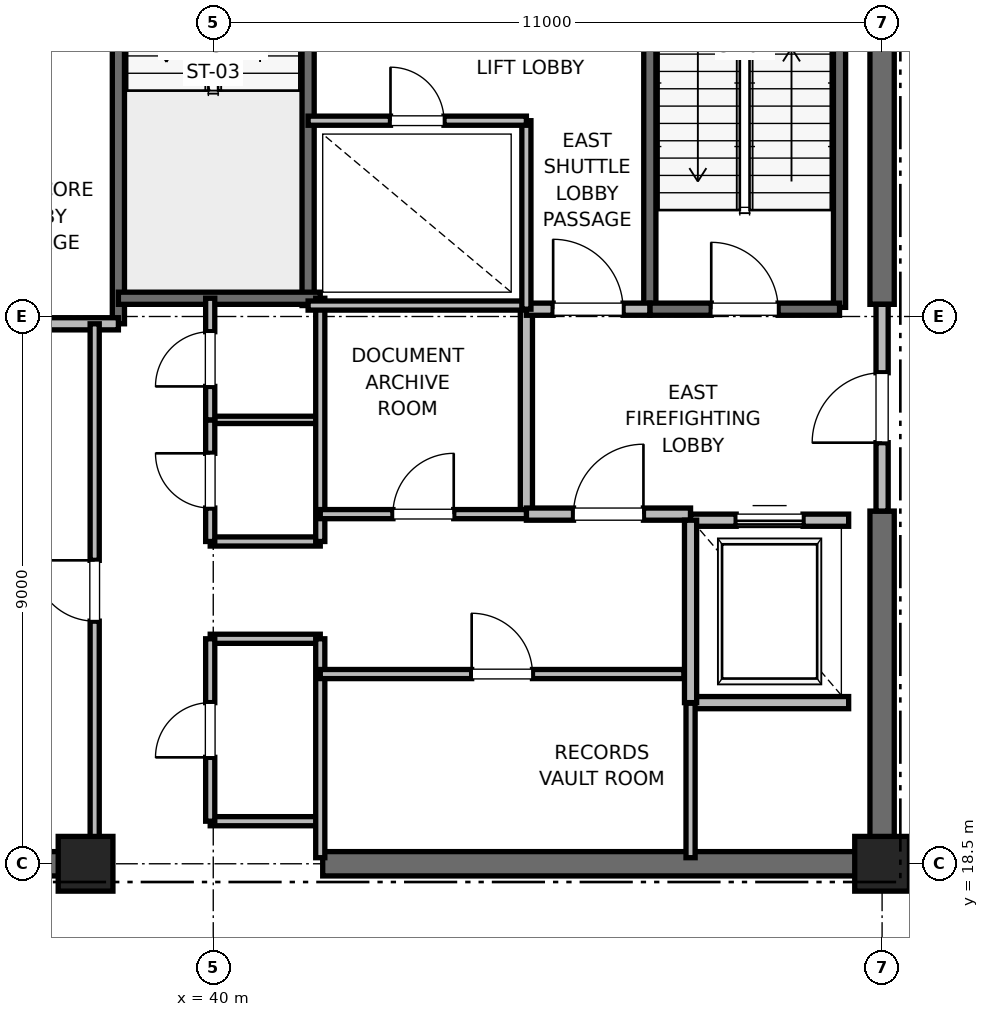
"""IFC4 building model, lengths in metres.
Left out: names, types, materials, properties, quantities, classifications, styles, units other than length and angle.
Written with IfcOpenShell. Run it as: python <this file> out.ifc"""

import sys

from ifc_helpers import new_model, si_unit, direction, frame, frame_2d, origin, origin_2d, place, context, subcontext, project, spatial, rectangle, extrude, element, fill, save


model = new_model("IFC4")
c1 = context("Model", 3, precision=1e-05, world=origin(), true_north=direction((0.0, 1.0)))
c2 = subcontext(c1, "Body", "Model", "MODEL_VIEW")
j1 = project(units=[si_unit("LENGTHUNIT", "METRE"), si_unit("PLANEANGLEUNIT", "RADIAN")], contexts=[c1])
p1 = place(None, origin())
s1 = spatial("IfcSite", under=j1, at=p1, CompositionType="ELEMENT")
p2 = place(p1, origin())
s2 = spatial("IfcBuilding", under=s1, at=p2, CompositionType="ELEMENT")
p3 = place(p2, frame((0.0, 0.0, 322.8)))
s3 = spatial("IfcBuildingStorey", under=s2, at=p3, CompositionType="ELEMENT", Elevation=322.8)
for number, where, z_axis, x_axis in (
    (1, (51.0, 18.5, 0.0), (0.0, 0.0, 1.0), (1.0, 0.0, 0.0)),
    (2, (37.9, 18.5, 0.0), (0.0, 0.0, 1.0), (1.0, 0.0, 0.0)),
):
    element("IfcColumn", number, at=place(p3, frame(where, z_axis=z_axis, x_axis=x_axis)), inside=s3, PredefinedType="PILASTER", context=c2, shape_type="SweptSolid", body=[
        extrude(rectangle(XDim=0.9, YDim=0.9, at=origin_2d()), origin(), (0.0, 0.0, 1.0), 4.0),
    ])
for number, where, z_axis, x_axis in (
    (3, (29.0, 18.5, 0.0), (0.0, 0.0, 1.0), (1.0, 0.0, 0.0)),
    (4, (41.8, 18.5, 0.0), (0.0, 0.0, 1.0), (1.0, 0.0, 0.0)),
):
    element("IfcWall", number, at=place(p3, frame(where, z_axis=z_axis, x_axis=x_axis)), inside=s3, PredefinedType="SHEAR", context=c2, shape_type="SweptSolid", body=[
        extrude(rectangle(XDim=9.2, YDim=0.4, at=frame_2d((4.6, 0.0))), origin(), (0.0, 0.0, 1.0), 3.785),
    ])
p4 = place(p3, frame((51.0, 18.5, 0.0), z_axis=(0.0, 0.0, 1.0), x_axis=(0.0, 1.0, 0.0)))
e5 = element("IfcWall", 5, at=p4, inside=s3, PredefinedType="SHEAR", context=c2, shape_type="SweptSolid", body=[
    extrude(rectangle(XDim=5.8, YDim=0.4, at=frame_2d((2.9, 0.0))), origin(), (0.0, 0.0, 1.0), 3.785),
])
p5 = place(p3, frame((51.0, 27.7, 0.0), z_axis=(0.0, 0.0, 1.0), x_axis=(0.0, 1.0, 0.0)))
e6 = element("IfcWall", 6, at=p5, inside=s3, PredefinedType="SHEAR", context=c2, shape_type="SweptSolid", body=[
    extrude(rectangle(XDim=8.8, YDim=0.4, at=frame_2d((4.4, 0.0))), origin(), (0.0, 0.0, 1.0), 3.785),
])
p6 = place(p3, frame((50.3, 27.65, 0.0), z_axis=(0.0, 0.0, 1.0), x_axis=(0.0, 1.0, 0.0)))
e7 = element("IfcWall", 7, at=p6, inside=s3, PredefinedType="SOLIDWALL", context=c2, shape_type="SweptSolid", body=[
    extrude(rectangle(XDim=8.15, YDim=0.2, at=frame_2d((4.075, 0.0))), origin(), (0.0, 0.0, 1.0), 3.785),
])
p7 = place(p3, frame((47.18, 27.62, 0.0), z_axis=(0.0, 0.0, 1.0), x_axis=(0.0, 1.0, 0.0)))
e8 = element("IfcWall", 8, at=p7, inside=s3, PredefinedType="SOLIDWALL", context=c2, shape_type="SweptSolid", body=[
    extrude(rectangle(XDim=8.18, YDim=0.2, at=frame_2d((4.09, 0.0))), origin(), (0.0, 0.0, 1.0), 3.785),
])
p8 = place(p3, frame((47.18, 27.62, 0.0), z_axis=(0.0, 0.0, 1.0), x_axis=(1.0, 0.0, 0.0)))
e9 = element("IfcWall", 9, at=p8, inside=s3, PredefinedType="SOLIDWALL", context=c2, shape_type="SweptSolid", body=[
    extrude(rectangle(XDim=3.12, YDim=0.2, at=frame_2d((1.56, 0.0))), origin(), (0.0, 0.0, 1.0), 3.785),
])
p9 = place(p8, frame((1.01, 0.0, 0.0)))
e10 = element("IfcOpeningElement", 10, at=p9, cuts=e9, PredefinedType="OPENING", context=c2, shape_type="SweptSolid", body=[
    extrude(rectangle(XDim=1.1, YDim=2.15, at=frame_2d((0.55, 1.075))), frame((0.0, 0.1, 0.0), z_axis=(0.0, -1.0, 0.0), x_axis=(1.0, 0.0, 0.0)), (0.0, 0.0, 1.0), 0.2),
])
p10 = place(p3, frame((38.44, 27.38, 0.0), z_axis=(0.0, 0.0, 1.0), x_axis=(0.0, 1.0, 0.0)))
e11 = element("IfcWall", 11, at=p10, inside=s3, PredefinedType="SOLIDWALL", context=c2, shape_type="SweptSolid", body=[
    extrude(rectangle(XDim=8.87, YDim=0.2, at=frame_2d((4.435, 0.0))), origin(), (0.0, 0.0, 1.0), 3.785),
])
p11 = place(p3, frame((41.56, 27.68, 0.0), z_axis=(0.0, 0.0, 1.0), x_axis=(0.0, 1.0, 0.0)))
e12 = element("IfcWall", 12, at=p11, inside=s3, PredefinedType="SOLIDWALL", context=c2, shape_type="SweptSolid", body=[
    extrude(rectangle(XDim=8.57, YDim=0.2, at=frame_2d((4.285, 0.0))), origin(), (0.0, 0.0, 1.0), 3.785),
])
p12 = place(p3, frame((38.44, 27.8, 0.0), z_axis=(0.0, 0.0, 1.0), x_axis=(1.0, 0.0, 0.0)))
e13 = element("IfcWall", 13, at=p12, inside=s3, PredefinedType="SOLIDWALL", context=c2, shape_type="SweptSolid", body=[
    extrude(rectangle(XDim=3.32, YDim=0.2, at=frame_2d((1.66, 0.0))), origin(), (0.0, 0.0, 1.0), 3.785),
])
p13 = place(p3, frame((32.82, 27.38, 0.0), z_axis=(0.0, 0.0, 1.0), x_axis=(1.0, 0.0, 0.0)))
e14 = element("IfcWall", 14, at=p13, inside=s3, PredefinedType="PARTITIONING", context=c2, shape_type="SweptSolid", body=[
    extrude(rectangle(XDim=5.62, YDim=0.2, at=frame_2d((2.81, 0.0))), origin(), (0.0, 0.0, 1.0), 3.785),
])
p14 = place(p3, frame((45.15, 24.25, 0.0), z_axis=(0.0, 0.0, 1.0), x_axis=(0.0, 1.0, 0.0)))
e15 = element("IfcWall", 15, at=p14, inside=s3, PredefinedType="PARTITIONING", context=c2, shape_type="SweptSolid", body=[
    extrude(rectangle(XDim=3.37, YDim=0.2, at=frame_2d((1.685, 0.0))), origin(), (0.0, 0.0, 1.0), 3.785),
])
p15 = place(p3, frame((45.15, 24.25, 0.0), z_axis=(0.0, 0.0, 1.0), x_axis=(1.0, 0.0, 0.0)))
e16 = element("IfcWall", 16, at=p15, inside=s3, PredefinedType="PARTITIONING", context=c2, shape_type="SweptSolid", body=[
    extrude(rectangle(XDim=2.7, YDim=0.2, at=frame_2d((1.35, 0.0))), origin(), (0.0, 0.0, 1.0), 3.785),
])
p16 = place(p15, frame((0.775, 0.0, 0.0)))
e17 = element("IfcOpeningElement", 17, at=p16, cuts=e16, PredefinedType="OPENING", context=c2, shape_type="SweptSolid", body=[
    extrude(rectangle(XDim=1.15, YDim=2.2, at=frame_2d((0.575, 1.1))), frame((0.0, 0.1, 0.0), z_axis=(0.0, -1.0, 0.0), x_axis=(1.0, 0.0, 0.0)), (0.0, 0.0, 1.0), 0.2),
])
p17 = place(p3, frame((45.15, 27.62, 0.0), z_axis=(0.0, 0.0, 1.0), x_axis=(1.0, 0.0, 0.0)))
e18 = element("IfcWall", 18, at=p17, inside=s3, PredefinedType="PARTITIONING", context=c2, shape_type="SweptSolid", body=[
    extrude(rectangle(XDim=2.03, YDim=0.2, at=frame_2d((1.015, 0.0))), origin(), (0.0, 0.0, 1.0), 3.785),
])
p18 = place(p17, frame((0.44, 0.0, 0.0)))
e19 = element("IfcOpeningElement", 19, at=p18, cuts=e18, PredefinedType="OPENING", context=c2, shape_type="SweptSolid", body=[
    extrude(rectangle(XDim=1.15, YDim=2.2, at=frame_2d((0.575, 1.1))), frame((0.0, 0.1, 0.0), z_axis=(0.0, -1.0, 0.0), x_axis=(1.0, 0.0, 0.0)), (0.0, 0.0, 1.0), 0.2),
])
p19 = place(p3, frame((51.0, 24.3, 0.0), z_axis=(0.0, 0.0, 1.0), x_axis=(0.0, 1.0, 0.0)))
e20 = element("IfcWall", 20, at=p19, inside=s3, PredefinedType="PARTITIONING", context=c2, shape_type="SweptSolid", body=[
    extrude(rectangle(XDim=3.4, YDim=0.2, at=frame_2d((1.7, 0.0))), origin(), (0.0, 0.0, 1.0), 2.865),
])
p20 = place(p19, frame((1.125, 0.0, 0.0)))
e21 = element("IfcOpeningElement", 21, at=p20, cuts=e20, PredefinedType="OPENING", context=c2, shape_type="SweptSolid", body=[
    extrude(rectangle(XDim=1.15, YDim=2.2, at=frame_2d((0.575, 1.1))), frame((0.0, 0.1, 0.0), z_axis=(0.0, -1.0, 0.0), x_axis=(1.0, 0.0, 0.0)), (0.0, 0.0, 1.0), 0.2),
])
p21 = place(p3, frame((47.85, 21.15, 0.0), z_axis=(0.0, 0.0, 1.0), x_axis=(1.0, 0.0, 0.0)))
e22 = element("IfcWall", 22, at=p21, inside=s3, PredefinedType="SOLIDWALL", context=c2, shape_type="SweptSolid", body=[
    extrude(rectangle(XDim=2.6, YDim=0.2, at=frame_2d((1.3, 0.0))), origin(), (0.0, 0.0, 1.0), 3.785),
])
p22 = place(p3, frame((50.45, 24.15, 0.0), z_axis=(0.0, 0.0, 1.0), x_axis=(-1.0, 0.0, 0.0)))
e23 = element("IfcWall", 23, at=p22, inside=s3, PredefinedType="SOLIDWALL", context=c2, shape_type="SweptSolid", body=[
    extrude(rectangle(XDim=2.6, YDim=0.2, at=frame_2d((1.3, 0.0))), origin(), (0.0, 0.0, 1.0), 2.865),
])
p23 = place(p22, frame((0.75, 0.0, 0.0)))
e24 = element("IfcOpeningElement", 24, at=p23, cuts=e23, PredefinedType="OPENING", context=c2, shape_type="SweptSolid", body=[
    extrude(rectangle(XDim=1.1, YDim=2.2, at=frame_2d((0.55, 1.1))), frame((0.0, 0.1, 0.0), z_axis=(0.0, -1.0, 0.0), x_axis=(1.0, 0.0, 0.0)), (0.0, 0.0, 1.0), 0.2),
])
p24 = place(p3, frame((47.85, 24.15, 0.0), z_axis=(0.0, 0.0, 1.0), x_axis=(0.0, -1.0, 0.0)))
e25 = element("IfcWall", 25, at=p24, inside=s3, PredefinedType="SOLIDWALL", context=c2, shape_type="SweptSolid", body=[
    extrude(rectangle(XDim=3.0, YDim=0.2, at=frame_2d((1.5, 0.0))), origin(), (0.0, 0.0, 1.0), 3.785),
])
for number, where, z_axis, x_axis in (
    (26, (39.95, 19.2, 0.0), (0.0, 0.0, 1.0), (1.0, 0.0, 0.0)),
    (27, (39.95, 22.2, 0.0), (0.0, 0.0, 1.0), (1.0, 0.0, 0.0)),
    (28, (39.95, 23.8, 0.0), (0.0, 0.0, 1.0), (1.0, 0.0, 0.0)),
):
    element("IfcWall", number, at=place(p3, frame(where, z_axis=z_axis, x_axis=x_axis)), inside=s3, PredefinedType="PARTITIONING", context=c2, shape_type="SweptSolid", body=[
        extrude(rectangle(XDim=1.81, YDim=0.15, at=frame_2d((0.905, 0.0))), origin(), (0.0, 0.0, 1.0), 2.85),
    ])
p25 = place(p3, frame((39.95, 25.8, 0.0), z_axis=(0.0, 0.0, 1.0), x_axis=(1.0, 0.0, 0.0)))
e29 = element("IfcWall", 29, at=p25, inside=s3, PredefinedType="PARTITIONING", context=c2, shape_type="SweptSolid", body=[
    extrude(rectangle(XDim=1.81, YDim=0.12, at=frame_2d((0.905, 0.0))), origin(), (0.0, 0.0, 1.0), 2.85),
])
p26 = place(p3, frame((41.76, 18.6, 0.0), z_axis=(0.0, 0.0, 1.0), x_axis=(0.0, 1.0, 0.0)))
e30 = element("IfcWall", 30, at=p26, inside=s3, PredefinedType="PARTITIONING", context=c2, shape_type="SweptSolid", body=[
    extrude(rectangle(XDim=3.6, YDim=0.15, at=frame_2d((1.8, 0.0))), origin(), (0.0, 0.0, 1.0), 2.85),
])
p27 = place(p3, frame((41.76, 23.8, 0.0), z_axis=(0.0, 0.0, 1.0), x_axis=(0.0, 1.0, 0.0)))
e31 = element("IfcWall", 31, at=p27, inside=s3, PredefinedType="PARTITIONING", context=c2, shape_type="SweptSolid", body=[
    extrude(rectangle(XDim=4.0, YDim=0.15, at=frame_2d((2.0, 0.0))), origin(), (0.0, 0.0, 1.0), 2.85),
])
p28 = place(p3, frame((39.95, 19.2, 0.0), z_axis=(0.0, 0.0, 1.0), x_axis=(0.0, 1.0, 0.0)))
e32 = element("IfcWall", 32, at=p28, inside=s3, PredefinedType="PARTITIONING", context=c2, shape_type="SweptSolid", body=[
    extrude(rectangle(XDim=3.0, YDim=0.15, at=frame_2d((1.5, 0.0))), origin(), (0.0, 0.0, 1.0), 2.85),
])
p29 = place(p28, frame((1.05, 0.0, 0.0)))
e33 = element("IfcOpeningElement", 33, at=p29, cuts=e32, PredefinedType="OPENING", context=c2, shape_type="SweptSolid", body=[
    extrude(rectangle(XDim=0.9, YDim=2.1, at=frame_2d((0.45, 1.05))), frame((0.0, 0.075, 0.0), z_axis=(0.0, -1.0, 0.0), x_axis=(1.0, 0.0, 0.0)), (0.0, 0.0, 1.0), 0.15),
])
p30 = place(p3, frame((39.95, 23.8, 0.0), z_axis=(0.0, 0.0, 1.0), x_axis=(0.0, 1.0, 0.0)))
e34 = element("IfcWall", 34, at=p30, inside=s3, PredefinedType="PARTITIONING", context=c2, shape_type="SweptSolid", body=[
    extrude(rectangle(XDim=2.0, YDim=0.15, at=frame_2d((1.0, 0.0))), origin(), (0.0, 0.0, 1.0), 2.85),
])
p31 = place(p30, frame((0.55, 0.0, 0.0)))
e35 = element("IfcOpeningElement", 35, at=p31, cuts=e34, PredefinedType="OPENING", context=c2, shape_type="SweptSolid", body=[
    extrude(rectangle(XDim=0.9, YDim=2.1, at=frame_2d((0.45, 1.05))), frame((0.0, 0.075, 0.0), z_axis=(0.0, -1.0, 0.0), x_axis=(1.0, 0.0, 0.0)), (0.0, 0.0, 1.0), 0.15),
])
p32 = place(p3, frame((39.95, 25.8, 0.0), z_axis=(0.0, 0.0, 1.0), x_axis=(0.0, 1.0, 0.0)))
e36 = element("IfcWall", 36, at=p32, inside=s3, PredefinedType="PARTITIONING", context=c2, shape_type="SweptSolid", body=[
    extrude(rectangle(XDim=2.0, YDim=0.15, at=frame_2d((1.0, 0.0))), origin(), (0.0, 0.0, 1.0), 2.85),
])
p33 = place(p32, frame((0.55, 0.0, 0.0)))
e37 = element("IfcOpeningElement", 37, at=p33, cuts=e36, PredefinedType="OPENING", context=c2, shape_type="SweptSolid", body=[
    extrude(rectangle(XDim=0.9, YDim=2.1, at=frame_2d((0.45, 1.05))), frame((0.0, 0.075, 0.0), z_axis=(0.0, -1.0, 0.0), x_axis=(1.0, 0.0, 0.0)), (0.0, 0.0, 1.0), 0.15),
])
p34 = place(p3, frame((38.05, 18.6, 0.0), z_axis=(0.0, 0.0, 1.0), x_axis=(0.0, 1.0, 0.0)))
e38 = element("IfcWall", 38, at=p34, inside=s3, PredefinedType="PARTITIONING", context=c2, shape_type="SweptSolid", body=[
    extrude(rectangle(XDim=8.78, YDim=0.15, at=frame_2d((4.39, 0.0))), origin(), (0.0, 0.0, 1.0), 2.85),
])
p35 = place(p34, frame((3.89, 0.0, 0.0)))
e39 = element("IfcOpeningElement", 39, at=p35, cuts=e38, PredefinedType="OPENING", context=c2, shape_type="SweptSolid", body=[
    extrude(rectangle(XDim=1.0, YDim=2.15, at=frame_2d((0.5, 1.075))), frame((0.0, 0.075, 0.0), z_axis=(0.0, -1.0, 0.0), x_axis=(1.0, 0.0, 0.0)), (0.0, 0.0, 1.0), 0.15),
])
p36 = place(p3, frame((41.56, 27.68, 0.0), z_axis=(0.0, 0.0, 1.0), x_axis=(1.0, 0.0, 0.0)))
e40 = element("IfcWall", 40, at=p36, inside=s3, PredefinedType="PARTITIONING", context=c2, shape_type="SweptSolid", body=[
    extrude(rectangle(XDim=3.59, YDim=0.15, at=frame_2d((1.795, 0.0))), origin(), (0.0, 0.0, 1.0), 2.85),
])
p37 = place(p3, frame((47.85, 18.6, 0.0), z_axis=(0.0, 0.0, 1.0), x_axis=(0.0, 1.0, 0.0)))
e41 = element("IfcWall", 41, at=p37, inside=s3, PredefinedType="PARTITIONING", context=c2, shape_type="SweptSolid", body=[
    extrude(rectangle(XDim=2.54, YDim=0.15, at=frame_2d((1.27, 0.0))), origin(), (0.0, 0.0, 1.0), 2.85),
])
p38 = place(p3, frame((41.76, 21.62, 0.0), z_axis=(0.0, 0.0, 1.0), x_axis=(1.0, 0.0, 0.0)))
e42 = element("IfcWall", 42, at=p38, inside=s3, PredefinedType="PARTITIONING", context=c2, shape_type="SweptSolid", body=[
    extrude(rectangle(XDim=5.98, YDim=0.15, at=frame_2d((2.99, 0.0))), origin(), (0.0, 0.0, 1.0), 2.85),
])
p39 = place(p38, frame((2.49, 0.0, 0.0)))
e43 = element("IfcOpeningElement", 43, at=p39, cuts=e42, PredefinedType="OPENING", context=c2, shape_type="SweptSolid", body=[
    extrude(rectangle(XDim=1.0, YDim=2.15, at=frame_2d((0.5, 1.075))), frame((0.0, 0.075, 0.0), z_axis=(0.0, -1.0, 0.0), x_axis=(1.0, 0.0, 0.0)), (0.0, 0.0, 1.0), 0.15),
])
p40 = place(p3, frame((41.76, 24.25, 0.0), z_axis=(0.0, 0.0, 1.0), x_axis=(1.0, 0.0, 0.0)))
e44 = element("IfcWall", 44, at=p40, inside=s3, PredefinedType="PARTITIONING", context=c2, shape_type="SweptSolid", body=[
    extrude(rectangle(XDim=3.39, YDim=0.15, at=frame_2d((1.695, 0.0))), origin(), (0.0, 0.0, 1.0), 2.85),
])
p41 = place(p40, frame((1.195, 0.0, 0.0)))
e45 = element("IfcOpeningElement", 45, at=p41, cuts=e44, PredefinedType="OPENING", context=c2, shape_type="SweptSolid", body=[
    extrude(rectangle(XDim=1.0, YDim=2.15, at=frame_2d((0.5, 1.075))), frame((0.0, 0.075, 0.0), z_axis=(0.0, -1.0, 0.0), x_axis=(1.0, 0.0, 0.0)), (0.0, 0.0, 1.0), 0.15),
])
p42 = place(p3, frame((45.15, 27.62, 0.0), z_axis=(0.0, 0.0, 1.0), x_axis=(0.0, 1.0, 0.0)))
e46 = element("IfcWall", 46, at=p42, inside=s3, PredefinedType="PARTITIONING", context=c2, shape_type="SweptSolid", body=[
    extrude(rectangle(XDim=3.1, YDim=0.15, at=frame_2d((1.55, 0.0))), origin(), (0.0, 0.0, 1.0), 2.85),
])
p43 = place(p3, frame((41.56, 30.72, 0.0), z_axis=(0.0, 0.0, 1.0), x_axis=(1.0, 0.0, 0.0)))
e47 = element("IfcWall", 47, at=p43, inside=s3, PredefinedType="PARTITIONING", context=c2, shape_type="SweptSolid", body=[
    extrude(rectangle(XDim=3.59, YDim=0.15, at=frame_2d((1.795, 0.0))), origin(), (0.0, 0.0, 1.0), 2.85),
])
p44 = place(p43, frame((1.355, 0.0, 0.0)))
e48 = element("IfcOpeningElement", 48, at=p44, cuts=e47, PredefinedType="OPENING", context=c2, shape_type="SweptSolid", body=[
    extrude(rectangle(XDim=0.88, YDim=2.1, at=frame_2d((0.44, 1.05))), frame((0.0, 0.075, 0.0), z_axis=(0.0, -1.0, 0.0), x_axis=(1.0, 0.0, 0.0)), (0.0, 0.0, 1.0), 0.15),
])
p45 = place(p9, origin())
e49 = element("IfcDoor", 49, at=p45, inside=s3, OperationType="SINGLE_SWING_LEFT", PredefinedType="DOOR", context=c2, shape_type="SweptSolid", body=[
    extrude(rectangle(XDim=1.1, YDim=2.15, at=frame_2d((0.55, 1.075))), frame((0.0, 0.025, 0.0), z_axis=(0.0, -1.0, 0.0), x_axis=(1.0, 0.0, 0.0)), (0.0, 0.0, 1.0), 0.05),
])
fill(e10, e49)
p46 = place(p16, origin())
e50 = element("IfcDoor", 50, at=p46, inside=s3, OperationType="SINGLE_SWING_RIGHT", PredefinedType="DOOR", context=c2, shape_type="SweptSolid", body=[
    extrude(rectangle(XDim=1.15, YDim=2.2, at=frame_2d((0.575, 1.1))), frame((0.0, 0.025, 0.0), z_axis=(0.0, -1.0, 0.0), x_axis=(1.0, 0.0, 0.0)), (0.0, 0.0, 1.0), 0.05),
])
fill(e17, e50)
p47 = place(p18, origin())
e51 = element("IfcDoor", 51, at=p47, inside=s3, OperationType="SINGLE_SWING_LEFT", PredefinedType="DOOR", context=c2, shape_type="SweptSolid", body=[
    extrude(rectangle(XDim=1.15, YDim=2.2, at=frame_2d((0.575, 1.1))), frame((0.0, 0.025, 0.0), z_axis=(0.0, -1.0, 0.0), x_axis=(1.0, 0.0, 0.0)), (0.0, 0.0, 1.0), 0.05),
])
fill(e19, e51)
p48 = place(p20, origin())
e52 = element("IfcDoor", 52, at=p48, inside=s3, OperationType="SINGLE_SWING_LEFT", PredefinedType="DOOR", context=c2, shape_type="SweptSolid", body=[
    extrude(rectangle(XDim=1.15, YDim=2.2, at=frame_2d((0.575, 1.1))), frame((0.0, 0.025, 0.0), z_axis=(0.0, -1.0, 0.0), x_axis=(1.0, 0.0, 0.0)), (0.0, 0.0, 1.0), 0.05),
])
fill(e21, e52)
p49 = place(p23, origin())
e53 = element("IfcDoor", 53, at=p49, inside=s3, OperationType="SLIDING_TO_RIGHT", PredefinedType="DOOR", context=c2, shape_type="SweptSolid", body=[
    extrude(rectangle(XDim=1.1, YDim=2.2, at=frame_2d((0.55, 1.1))), frame((0.0, 0.025, 0.0), z_axis=(0.0, -1.0, 0.0), x_axis=(1.0, 0.0, 0.0)), (0.0, 0.0, 1.0), 0.05),
])
fill(e24, e53)
p50 = place(p29, origin())
e54 = element("IfcDoor", 54, at=p50, inside=s3, OperationType="SINGLE_SWING_LEFT", PredefinedType="DOOR", context=c2, shape_type="SweptSolid", body=[
    extrude(rectangle(XDim=0.9, YDim=2.1, at=frame_2d((0.45, 1.05))), frame((0.0, 0.025, 0.0), z_axis=(0.0, -1.0, 0.0), x_axis=(1.0, 0.0, 0.0)), (0.0, 0.0, 1.0), 0.05),
])
fill(e33, e54)
p51 = place(p31, origin())
e55 = element("IfcDoor", 55, at=p51, inside=s3, OperationType="SINGLE_SWING_RIGHT", PredefinedType="DOOR", context=c2, shape_type="SweptSolid", body=[
    extrude(rectangle(XDim=0.9, YDim=2.1, at=frame_2d((0.45, 1.05))), frame((0.0, 0.025, 0.0), z_axis=(0.0, -1.0, 0.0), x_axis=(1.0, 0.0, 0.0)), (0.0, 0.0, 1.0), 0.05),
])
fill(e35, e55)
p52 = place(p33, origin())
e56 = element("IfcDoor", 56, at=p52, inside=s3, OperationType="SINGLE_SWING_LEFT", PredefinedType="DOOR", context=c2, shape_type="SweptSolid", body=[
    extrude(rectangle(XDim=0.9, YDim=2.1, at=frame_2d((0.45, 1.05))), frame((0.0, 0.025, 0.0), z_axis=(0.0, -1.0, 0.0), x_axis=(1.0, 0.0, 0.0)), (0.0, 0.0, 1.0), 0.05),
])
fill(e37, e56)
p53 = place(p35, origin())
e57 = element("IfcDoor", 57, at=p53, inside=s3, OperationType="SINGLE_SWING_RIGHT", PredefinedType="DOOR", context=c2, shape_type="SweptSolid", body=[
    extrude(rectangle(XDim=1.0, YDim=2.15, at=frame_2d((0.5, 1.075))), frame((0.0, 0.025, 0.0), z_axis=(0.0, -1.0, 0.0), x_axis=(1.0, 0.0, 0.0)), (0.0, 0.0, 1.0), 0.05),
])
fill(e39, e57)
p54 = place(p39, origin())
e58 = element("IfcDoor", 58, at=p54, inside=s3, OperationType="SINGLE_SWING_LEFT", PredefinedType="DOOR", context=c2, shape_type="SweptSolid", body=[
    extrude(rectangle(XDim=1.0, YDim=2.15, at=frame_2d((0.5, 1.075))), frame((0.0, 0.025, 0.0), z_axis=(0.0, -1.0, 0.0), x_axis=(1.0, 0.0, 0.0)), (0.0, 0.0, 1.0), 0.05),
])
fill(e43, e58)
p55 = place(p41, origin())
e59 = element("IfcDoor", 59, at=p55, inside=s3, OperationType="SINGLE_SWING_RIGHT", PredefinedType="DOOR", context=c2, shape_type="SweptSolid", body=[
    extrude(rectangle(XDim=1.0, YDim=2.15, at=frame_2d((0.5, 1.075))), frame((0.0, 0.025, 0.0), z_axis=(0.0, -1.0, 0.0), x_axis=(1.0, 0.0, 0.0)), (0.0, 0.0, 1.0), 0.05),
])
fill(e45, e59)
p56 = place(p44, origin())
e60 = element("IfcDoor", 60, at=p56, inside=s3, OperationType="SINGLE_SWING_LEFT", PredefinedType="DOOR", context=c2, shape_type="SweptSolid", body=[
    extrude(rectangle(XDim=0.88, YDim=2.1, at=frame_2d((0.44, 1.05))), frame((0.0, 0.025, 0.0), z_axis=(0.0, -1.0, 0.0), x_axis=(1.0, 0.0, 0.0)), (0.0, 0.0, 1.0), 0.05),
])
fill(e48, e60)
save(model, sys.argv[1])
